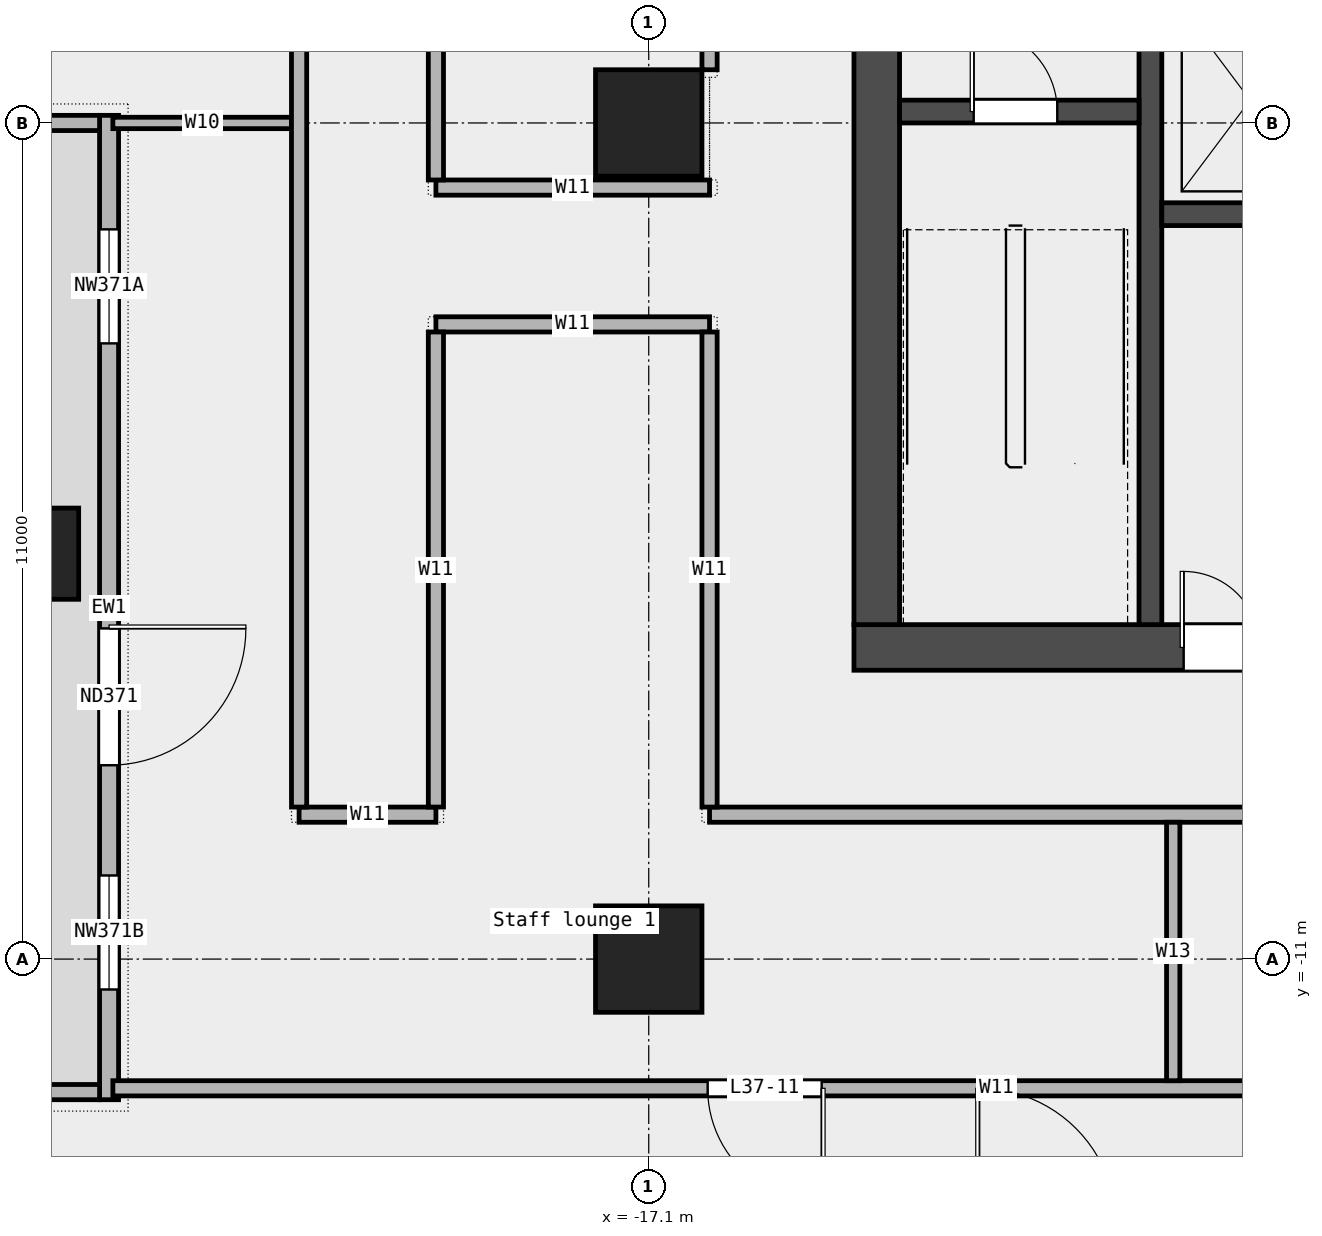
"""IFC4 building model, lengths in metres.
Left out: names, types, materials, properties, quantities, classifications, styles, units other than length and angle.
Written with IfcOpenShell. Run it as: python <this file> out.ifc"""

import sys

from ifc_helpers import new_model, si_unit, direction, frame, frame_2d, origin, origin_2d, place, context, subcontext, project, spatial, rectangle, extrude, element, fill, save


model = new_model("IFC4")
c1 = context("Model", 3, precision=1e-05, world=origin(), true_north=direction((0.0, 1.0)))
c2 = subcontext(c1, "Body", "Model", "MODEL_VIEW")
j1 = project(units=[si_unit("LENGTHUNIT", "METRE"), si_unit("PLANEANGLEUNIT", "RADIAN")], contexts=[c1])
p1 = place(None, origin())
s1 = spatial("IfcSite", under=j1, at=p1, CompositionType="ELEMENT")
p2 = place(p1, origin())
s2 = spatial("IfcBuilding", under=s1, at=p2, CompositionType="ELEMENT")
p3 = place(p2, frame((0.0, 0.0, 181.0)))
s3 = spatial("IfcBuildingStorey", under=s2, at=p3, CompositionType="ELEMENT", Elevation=181.0)
p4 = place(p3, frame((-25.2, -5.667, 0.0), z_axis=(0.0, 0.0, 1.0), x_axis=(1.0, 0.0, 0.0)))
e1 = element("IfcColumn", 1, at=p4, inside=s3, PredefinedType="COLUMN", context=c2, shape_type="SweptSolid", body=[
    extrude(rectangle(XDim=1.2, YDim=1.2, at=origin_2d()), origin(), (0.0, 0.0, 1.0), 3.6),
])
for number, where, z_axis, x_axis in (
    (2, (-17.1, -11.0, 0.0), (0.0, 0.0, 1.0), (1.0, 0.0, 0.0)),
    (3, (-17.1, 0.0, 0.0), (0.0, 0.0, 1.0), (1.0, 0.0, 0.0)),
):
    element("IfcColumn", number, at=place(p3, frame(where, z_axis=z_axis, x_axis=x_axis)), inside=s3, PredefinedType="COLUMN", context=c2, shape_type="SweptSolid", body=[
        extrude(rectangle(XDim=1.4, YDim=1.4, at=origin_2d()), origin(), (0.0, 0.0, 1.0), 3.6),
    ])
p5 = place(p3, frame((-24.2, 0.1, 0.0), z_axis=(0.0, 0.0, 1.0), x_axis=(0.0, -1.0, 0.0)))
e4 = element("IfcWall", 4, at=p5, inside=s3, PredefinedType="STANDARD", context=c2, shape_type="SweptSolid", body=[
    extrude(rectangle(XDim=12.95, YDim=0.25, at=frame_2d((6.475, 0.0))), origin(), (0.0, 0.0, 1.0), 3.6),
])
p6 = place(p5, frame((1.5, 0.0, 0.45)))
e5 = element("IfcOpeningElement", 5, at=p6, cuts=e4, PredefinedType="OPENING", context=c2, shape_type="SweptSolid", body=[
    extrude(rectangle(XDim=1.5, YDim=2.4, at=frame_2d((0.75, 1.2))), frame((0.0, 0.137, 0.0), z_axis=(0.0, -1.0, 0.0), x_axis=(1.0, 0.0, 0.0)), (0.0, 0.0, 1.0), 0.274),
])
p7 = place(p5, frame((6.75, 0.0, 0.0)))
e6 = element("IfcOpeningElement", 6, at=p7, cuts=e4, PredefinedType="OPENING", context=c2, shape_type="SweptSolid", body=[
    extrude(rectangle(XDim=1.8, YDim=2.4, at=frame_2d((0.9, 1.2))), frame((0.0, 0.137, 0.0), z_axis=(0.0, -1.0, 0.0), x_axis=(1.0, 0.0, 0.0)), (0.0, 0.0, 1.0), 0.274),
])
p8 = place(p5, frame((10.0, 0.0, 0.45)))
e7 = element("IfcOpeningElement", 7, at=p8, cuts=e4, PredefinedType="OPENING", context=c2, shape_type="SweptSolid", body=[
    extrude(rectangle(XDim=1.5, YDim=2.4, at=frame_2d((0.75, 1.2))), frame((0.0, 0.137, 0.0), z_axis=(0.0, -1.0, 0.0), x_axis=(1.0, 0.0, 0.0)), (0.0, 0.0, 1.0), 0.274),
])
for number, where, z_axis, x_axis in (
    (8, (-26.2, 0.0, 0.0), (0.0, 0.0, 1.0), (1.0, 0.0, 0.0)),
    (9, (-26.2, -12.75, 0.0), (0.0, 0.0, 1.0), (1.0, 0.0, 0.0)),
):
    element("IfcWall", number, at=place(p3, frame(where, z_axis=z_axis, x_axis=x_axis)), inside=s3, PredefinedType="STANDARD", context=c2, shape_type="SweptSolid", body=[
        extrude(rectangle(XDim=1.875, YDim=0.2, at=frame_2d((0.938, 0.0))), origin(), (0.0, 0.0, 1.0), 3.6),
    ])
p9 = place(p3, frame((-24.15, -12.7, 0.0), z_axis=(0.0, 0.0, 1.0), x_axis=(1.0, 0.0, 0.0)))
e10 = element("IfcWall", 10, at=p9, inside=s3, PredefinedType="PARTITIONING", context=c2, shape_type="SweptSolid", body=[
    extrude(rectangle(XDim=23.25, YDim=0.2, at=frame_2d((11.625, 0.0))), origin(), (0.0, 0.0, 1.0), 3.6),
])
p10 = place(p9, frame((19.35, 0.0, 0.0)))
e11 = element("IfcOpeningElement", 11, at=p10, cuts=e10, PredefinedType="OPENING", context=c2, shape_type="SweptSolid", body=[
    extrude(rectangle(XDim=0.9, YDim=2.1, at=frame_2d((0.45, 1.05))), frame((0.0, 0.112, 0.0), z_axis=(0.0, -1.0, 0.0), x_axis=(1.0, 0.0, 0.0)), (0.0, 0.0, 1.0), 0.224),
])
p11 = place(p9, frame((7.825, 0.0, 0.0)))
e12 = element("IfcOpeningElement", 12, at=p11, cuts=e10, PredefinedType="OPENING", context=c2, shape_type="SweptSolid", body=[
    extrude(rectangle(XDim=1.5, YDim=2.1, at=frame_2d((0.75, 1.05))), frame((0.0, 0.112, 0.0), z_axis=(0.0, -1.0, 0.0), x_axis=(1.0, 0.0, 0.0)), (0.0, 0.0, 1.0), 0.224),
])
p12 = place(p3, frame((-21.7, -9.1, 0.0), z_axis=(0.0, 0.0, 1.0), x_axis=(1.0, 0.0, 0.0)))
e13 = element("IfcWall", 13, at=p12, inside=s3, PredefinedType="PARTITIONING", context=c2, shape_type="SweptSolid", body=[
    extrude(rectangle(XDim=1.8, YDim=0.2, at=frame_2d((0.9, 0.0))), origin(), (0.0, 0.0, 1.0), 3.6),
])
p13 = place(p3, frame((-16.3, -9.1, 0.0), z_axis=(0.0, 0.0, 1.0), x_axis=(1.0, 0.0, 0.0)))
e14 = element("IfcWall", 14, at=p13, inside=s3, PredefinedType="PARTITIONING", context=c2, shape_type="SweptSolid", body=[
    extrude(rectangle(XDim=15.4, YDim=0.2, at=frame_2d((7.7, 0.0))), origin(), (0.0, 0.0, 1.0), 3.6),
])
for number, where, z_axis, x_axis in (
    (15, (-19.9, -2.65, 0.0), (0.0, 0.0, 1.0), (1.0, 0.0, 0.0)),
    (16, (-19.9, -0.85, 0.0), (0.0, 0.0, 1.0), (1.0, 0.0, 0.0)),
):
    element("IfcWall", number, at=place(p3, frame(where, z_axis=z_axis, x_axis=x_axis)), inside=s3, PredefinedType="PARTITIONING", context=c2, shape_type="SweptSolid", body=[
        extrude(rectangle(XDim=3.6, YDim=0.2, at=frame_2d((1.8, 0.0))), origin(), (0.0, 0.0, 1.0), 3.6),
    ])
p14 = place(p3, frame((-24.15, 0.0, 0.0), z_axis=(0.0, 0.0, 1.0), x_axis=(1.0, 0.0, 0.0)))
e17 = element("IfcWall", 17, at=p14, inside=s3, PredefinedType="PARTITIONING", context=c2, shape_type="SweptSolid", body=[
    extrude(rectangle(XDim=2.35, YDim=0.15, at=frame_2d((1.175, 0.0))), origin(), (0.0, 0.0, 1.0), 3.6),
])
p15 = place(p3, frame((-21.7, -9.0, 0.0), z_axis=(0.0, 0.0, 1.0), x_axis=(0.0, 1.0, 0.0)))
e18 = element("IfcWall", 18, at=p15, inside=s3, PredefinedType="PARTITIONING", context=c2, shape_type="SweptSolid", body=[
    extrude(rectangle(XDim=24.3, YDim=0.2, at=frame_2d((12.15, 0.0))), origin(), (0.0, 0.0, 1.0), 3.6),
])
p16 = place(p15, frame((16.05, 0.0, 0.0)))
e19 = element("IfcOpeningElement", 19, at=p16, cuts=e18, PredefinedType="OPENING", context=c2, shape_type="SweptSolid", body=[
    extrude(rectangle(XDim=1.2, YDim=2.1, at=frame_2d((0.6, 1.05))), frame((0.0, 0.112, 0.0), z_axis=(0.0, -1.0, 0.0), x_axis=(1.0, 0.0, 0.0)), (0.0, 0.0, 1.0), 0.224),
])
p17 = place(p3, frame((-19.9, -9.0, 0.0), z_axis=(0.0, 0.0, 1.0), x_axis=(0.0, 1.0, 0.0)))
e20 = element("IfcWall", 20, at=p17, inside=s3, PredefinedType="PARTITIONING", context=c2, shape_type="SweptSolid", body=[
    extrude(rectangle(XDim=6.25, YDim=0.2, at=frame_2d((3.125, 0.0))), origin(), (0.0, 0.0, 1.0), 3.6),
])
p18 = place(p3, frame((-19.9, -0.75, 0.0), z_axis=(0.0, 0.0, 1.0), x_axis=(0.0, 1.0, 0.0)))
e21 = element("IfcWall", 21, at=p18, inside=s3, PredefinedType="PARTITIONING", context=c2, shape_type="SweptSolid", body=[
    extrude(rectangle(XDim=16.05, YDim=0.2, at=frame_2d((8.025, 0.0))), origin(), (0.0, 0.0, 1.0), 3.6),
])
p19 = place(p3, frame((-16.3, -9.0, 0.0), z_axis=(0.0, 0.0, 1.0), x_axis=(0.0, 1.0, 0.0)))
e22 = element("IfcWall", 22, at=p19, inside=s3, PredefinedType="PARTITIONING", context=c2, shape_type="SweptSolid", body=[
    extrude(rectangle(XDim=6.25, YDim=0.2, at=frame_2d((3.125, 0.0))), origin(), (0.0, 0.0, 1.0), 3.6),
])
p20 = place(p3, frame((-16.3, 0.7, 0.0), z_axis=(0.0, 0.0, 1.0), x_axis=(0.0, 1.0, 0.0)))
e23 = element("IfcWall", 23, at=p20, inside=s3, PredefinedType="PARTITIONING", context=c2, shape_type="SweptSolid", body=[
    extrude(rectangle(XDim=9.6, YDim=0.2, at=frame_2d((4.8, 0.0))), origin(), (0.0, 0.0, 1.0), 3.6),
])
p21 = place(p20, frame((1.73, 0.0, 0.0)))
e24 = element("IfcOpeningElement", 24, at=p21, cuts=e23, PredefinedType="OPENING", context=c2, shape_type="SweptSolid", body=[
    extrude(rectangle(XDim=0.9, YDim=2.1, at=frame_2d((0.45, 1.05))), frame((0.0, 0.112, 0.0), z_axis=(0.0, -1.0, 0.0), x_axis=(1.0, 0.0, 0.0)), (0.0, 0.0, 1.0), 0.224),
])
p22 = place(p20, frame((6.353, 0.0, 0.0)))
e25 = element("IfcOpeningElement", 25, at=p22, cuts=e23, PredefinedType="OPENING", context=c2, shape_type="SweptSolid", body=[
    extrude(rectangle(XDim=0.9, YDim=2.1, at=frame_2d((0.45, 1.05))), frame((0.0, 0.112, 0.0), z_axis=(0.0, -1.0, 0.0), x_axis=(1.0, 0.0, 0.0)), (0.0, 0.0, 1.0), 0.224),
])
p23 = place(p3, frame((-10.2, -12.6, 0.0), z_axis=(0.0, 0.0, 1.0), x_axis=(0.0, 1.0, 0.0)))
e26 = element("IfcWall", 26, at=p23, inside=s3, PredefinedType="PARTITIONING", context=c2, shape_type="SweptSolid", body=[
    extrude(rectangle(XDim=3.4, YDim=0.175, at=frame_2d((1.7, 0.0))), origin(), (0.0, 0.0, 1.0), 3.6),
])
p24 = place(p3, frame((-14.4, -6.9, 0.0), z_axis=(0.0, 0.0, 1.0), x_axis=(1.0, 0.0, 0.0)))
e27 = element("IfcWall", 27, at=p24, inside=s3, PredefinedType="SHEAR", context=c2, shape_type="SweptSolid", body=[
    extrude(rectangle(XDim=28.8, YDim=0.6, at=frame_2d((14.4, 0.0))), origin(), (0.0, 0.0, 1.0), 3.7),
])
p25 = place(p24, frame((4.337, 0.0, 0.0)))
e28 = element("IfcOpeningElement", 28, at=p25, cuts=e27, PredefinedType="OPENING", context=c2, shape_type="SweptSolid", body=[
    extrude(rectangle(XDim=1.0, YDim=2.1, at=frame_2d((0.5, 1.05))), frame((0.0, 0.312, 0.0), z_axis=(0.0, -1.0, 0.0), x_axis=(1.0, 0.0, 0.0)), (0.0, 0.0, 1.0), 0.624),
])
p26 = place(p24, frame((8.925, 0.0, 0.0)))
e29 = element("IfcOpeningElement", 29, at=p26, cuts=e27, PredefinedType="OPENING", context=c2, shape_type="SweptSolid", body=[
    extrude(rectangle(XDim=1.2, YDim=2.1, at=frame_2d((0.6, 1.05))), frame((0.0, 0.312, 0.0), z_axis=(0.0, -1.0, 0.0), x_axis=(1.0, 0.0, 0.0)), (0.0, 0.0, 1.0), 0.624),
])
p27 = place(p24, frame((13.712, 0.0, 0.0)))
e30 = element("IfcOpeningElement", 30, at=p27, cuts=e27, PredefinedType="OPENING", context=c2, shape_type="SweptSolid", body=[
    extrude(rectangle(XDim=1.0, YDim=2.1, at=frame_2d((0.5, 1.05))), frame((0.0, 0.312, 0.0), z_axis=(0.0, -1.0, 0.0), x_axis=(1.0, 0.0, 0.0)), (0.0, 0.0, 1.0), 0.624),
])
p28 = place(p24, frame((15.587, 0.0, 0.0)))
e31 = element("IfcOpeningElement", 31, at=p28, cuts=e27, PredefinedType="OPENING", context=c2, shape_type="SweptSolid", body=[
    extrude(rectangle(XDim=1.0, YDim=2.1, at=frame_2d((0.5, 1.05))), frame((0.0, 0.312, 0.0), z_axis=(0.0, -1.0, 0.0), x_axis=(1.0, 0.0, 0.0)), (0.0, 0.0, 1.0), 0.624),
])
p29 = place(p24, frame((18.75, 0.0, 0.0)))
e32 = element("IfcOpeningElement", 32, at=p29, cuts=e27, PredefinedType="OPENING", context=c2, shape_type="SweptSolid", body=[
    extrude(rectangle(XDim=1.8, YDim=2.1, at=frame_2d((0.9, 1.05))), frame((0.0, 0.312, 0.0), z_axis=(0.0, -1.0, 0.0), x_axis=(1.0, 0.0, 0.0)), (0.0, 0.0, 1.0), 0.624),
])
p30 = place(p24, frame((23.087, 0.0, 0.0)))
e33 = element("IfcOpeningElement", 33, at=p30, cuts=e27, PredefinedType="OPENING", context=c2, shape_type="SweptSolid", body=[
    extrude(rectangle(XDim=1.0, YDim=2.1, at=frame_2d((0.5, 1.05))), frame((0.0, 0.312, 0.0), z_axis=(0.0, -1.0, 0.0), x_axis=(1.0, 0.0, 0.0)), (0.0, 0.0, 1.0), 0.624),
])
p31 = place(p3, frame((-14.1, -6.6, 0.0), z_axis=(0.0, 0.0, 1.0), x_axis=(0.0, 1.0, 0.0)))
e34 = element("IfcWall", 34, at=p31, inside=s3, PredefinedType="SHEAR", context=c2, shape_type="SweptSolid", body=[
    extrude(rectangle(XDim=19.5, YDim=0.6, at=frame_2d((9.75, 0.0))), origin(), (0.0, 0.0, 1.0), 3.7),
])
p32 = place(p31, frame((9.3, 0.0, 0.0)))
e35 = element("IfcOpeningElement", 35, at=p32, cuts=e34, PredefinedType="OPENING", context=c2, shape_type="SweptSolid", body=[
    extrude(rectangle(XDim=1.8, YDim=2.1, at=frame_2d((0.9, 1.05))), frame((0.0, 0.312, 0.0), z_axis=(0.0, -1.0, 0.0), x_axis=(1.0, 0.0, 0.0)), (0.0, 0.0, 1.0), 0.624),
])
p33 = place(p3, frame((-10.5, -6.6, 0.0), z_axis=(0.0, 0.0, 1.0), x_axis=(0.0, 1.0, 0.0)))
e36 = element("IfcWall", 36, at=p33, inside=s3, PredefinedType="SHEAR", context=c2, shape_type="SweptSolid", body=[
    extrude(rectangle(XDim=8.55, YDim=0.3, at=frame_2d((4.275, 0.0))), origin(), (0.0, 0.0, 1.0), 3.7),
])
p34 = place(p3, frame((-13.8, 0.15, 0.0), z_axis=(0.0, 0.0, 1.0), x_axis=(1.0, 0.0, 0.0)))
e37 = element("IfcWall", 37, at=p34, inside=s3, PredefinedType="SOLIDWALL", context=c2, shape_type="SweptSolid", body=[
    extrude(rectangle(XDim=3.15, YDim=0.3, at=frame_2d((1.575, 0.0))), origin(), (0.0, 0.0, 1.0), 3.7),
])
p35 = place(p34, frame((0.975, 0.0, 0.0)))
e38 = element("IfcOpeningElement", 38, at=p35, cuts=e37, PredefinedType="OPENING", context=c2, shape_type="SweptSolid", body=[
    extrude(rectangle(XDim=1.1, YDim=2.1, at=frame_2d((0.55, 1.05))), frame((0.0, 0.162, 0.0), z_axis=(0.0, -1.0, 0.0), x_axis=(1.0, 0.0, 0.0)), (0.0, 0.0, 1.0), 0.324),
])
p36 = place(p3, frame((-10.35, -1.2, 0.0), z_axis=(0.0, 0.0, 1.0), x_axis=(1.0, 0.0, 0.0)))
e39 = element("IfcWall", 39, at=p36, inside=s3, PredefinedType="SOLIDWALL", context=c2, shape_type="SweptSolid", body=[
    extrude(rectangle(XDim=20.7, YDim=0.3, at=frame_2d((10.35, 0.0))), origin(), (0.0, 0.0, 1.0), 3.7),
])
p37 = place(p6, origin())
e40 = element("IfcWindow", 40, at=p37, inside=s3, PartitioningType="SINGLE_PANEL", PredefinedType="WINDOW", context=c2, shape_type="SweptSolid", body=[
    extrude(rectangle(XDim=1.5, YDim=2.4, at=frame_2d((0.75, 1.2))), frame((0.0, 0.03, 0.0), z_axis=(0.0, -1.0, 0.0), x_axis=(1.0, 0.0, 0.0)), (0.0, 0.0, 1.0), 0.06),
])
fill(e5, e40)
p38 = place(p7, origin())
e41 = element("IfcDoor", 41, at=p38, inside=s3, OperationType="DOUBLE_DOOR_SINGLE_SWING", PredefinedType="DOOR", context=c2, shape_type="SweptSolid", body=[
    extrude(rectangle(XDim=1.8, YDim=2.4, at=frame_2d((0.9, 1.2))), frame((0.0, 0.025, 0.0), z_axis=(0.0, -1.0, 0.0), x_axis=(1.0, 0.0, 0.0)), (0.0, 0.0, 1.0), 0.05),
])
fill(e6, e41)
p39 = place(p8, origin())
e42 = element("IfcWindow", 42, at=p39, inside=s3, PartitioningType="SINGLE_PANEL", PredefinedType="WINDOW", context=c2, shape_type="SweptSolid", body=[
    extrude(rectangle(XDim=1.5, YDim=2.4, at=frame_2d((0.75, 1.2))), frame((0.0, 0.03, 0.0), z_axis=(0.0, -1.0, 0.0), x_axis=(1.0, 0.0, 0.0)), (0.0, 0.0, 1.0), 0.06),
])
fill(e7, e42)
p40 = place(p11, origin())
e43 = element("IfcDoor", 43, at=p40, inside=s3, OperationType="DOUBLE_DOOR_SINGLE_SWING", PredefinedType="DOOR", context=c2, shape_type="SweptSolid", body=[
    extrude(rectangle(XDim=1.5, YDim=2.1, at=frame_2d((0.75, 1.05))), frame((0.0, 0.025, 0.0), z_axis=(0.0, -1.0, 0.0), x_axis=(1.0, 0.0, 0.0)), (0.0, 0.0, 1.0), 0.05),
])
fill(e12, e43)
p41 = place(p35, origin())
e44 = element("IfcDoor", 44, at=p41, inside=s3, OperationType="SINGLE_SWING_LEFT", PredefinedType="DOOR", context=c2, shape_type="SweptSolid", body=[
    extrude(rectangle(XDim=1.1, YDim=2.1, at=frame_2d((0.55, 1.05))), frame((0.0, 0.025, 0.0), z_axis=(0.0, -1.0, 0.0), x_axis=(1.0, 0.0, 0.0)), (0.0, 0.0, 1.0), 0.05),
])
fill(e38, e44)
p42 = place(p25, origin())
e45 = element("IfcDoor", 45, at=p42, inside=s3, OperationType="SINGLE_SWING_LEFT", PredefinedType="DOOR", context=c2, shape_type="SweptSolid", body=[
    extrude(rectangle(XDim=1.0, YDim=2.1, at=frame_2d((0.5, 1.05))), frame((0.0, 0.025, 0.0), z_axis=(0.0, -1.0, 0.0), x_axis=(1.0, 0.0, 0.0)), (0.0, 0.0, 1.0), 0.05),
])
fill(e28, e45)
save(model, sys.argv[1])
